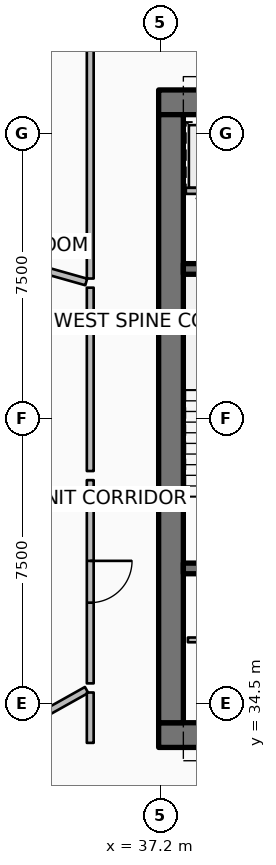
"""IFC4 building model, lengths in metres.
Left out: names, types, materials, properties, quantities, classifications, styles, units other than length and angle.
Written with IfcOpenShell. Run it as: python <this file> out.ifc"""

import sys

from ifc_helpers import new_model, si_unit, direction, frame, frame_2d, origin, place, context, subcontext, project, spatial, rectangle, extrude, element, fill, save


model = new_model("IFC4")
c1 = context("Model", 3, precision=1e-05, world=origin(), true_north=direction((0.0, 1.0)))
c2 = subcontext(c1, "Body", "Model", "MODEL_VIEW")
j1 = project(units=[si_unit("LENGTHUNIT", "METRE"), si_unit("PLANEANGLEUNIT", "RADIAN")], contexts=[c1])
p1 = place(None, origin())
s1 = spatial("IfcSite", under=j1, at=p1, CompositionType="ELEMENT")
p2 = place(p1, origin())
s2 = spatial("IfcBuilding", under=s1, at=p2, CompositionType="ELEMENT")
p3 = place(p2, frame((0.0, 0.0, 202.8)))
s3 = spatial("IfcBuildingStorey", under=s2, at=p3, CompositionType="ELEMENT", Elevation=202.8)
for number, where, z_axis, x_axis in (
    (1, (37.15, 33.675, 0.0), (0.0, 0.0, 1.0), (1.0, 0.0, 0.0)),
    (2, (37.15, 50.325, 0.0), (0.0, 0.0, 1.0), (1.0, 0.0, 0.0)),
):
    element("IfcWall", number, at=place(p3, frame(where, z_axis=z_axis, x_axis=x_axis)), inside=s3, PredefinedType="SHEAR", context=c2, shape_type="SweptSolid", body=[
        extrude(rectangle(XDim=9.75, YDim=0.65, at=frame_2d((4.875, 0.0))), origin(), (0.0, 0.0, 1.0), 3.75),
    ])
p4 = place(p3, frame((37.475, 34.0, 0.0), z_axis=(0.0, 0.0, 1.0), x_axis=(0.0, 1.0, 0.0)))
e3 = element("IfcWall", 3, at=p4, inside=s3, PredefinedType="SHEAR", context=c2, shape_type="SweptSolid", body=[
    extrude(rectangle(XDim=16.0, YDim=0.65, at=frame_2d((8.0, 0.0))), origin(), (0.0, 0.0, 1.0), 3.75),
])
for number, where, z_axis, x_axis in (
    (4, (37.8, 38.06, 0.0), (0.0, 0.0, 1.0), (1.0, 0.0, 0.0)),
    (5, (37.8, 45.94, 0.0), (0.0, 0.0, 1.0), (1.0, 0.0, 0.0)),
):
    element("IfcWall", number, at=place(p3, frame(where, z_axis=z_axis, x_axis=x_axis)), inside=s3, PredefinedType="SHEAR", context=c2, shape_type="SweptSolid", body=[
        extrude(rectangle(XDim=3.5, YDim=0.28, at=frame_2d((1.75, 0.0))), origin(), (0.0, 0.0, 1.0), 3.75),
    ])
p5 = place(p3, frame((39.975, 47.995, 0.0), z_axis=(0.0, 0.0, 1.0), x_axis=(-1.0, 0.0, 0.0)))
e6 = element("IfcWall", 6, at=p5, inside=s3, PredefinedType="PARTITIONING", context=c2, shape_type="SweptSolid", body=[
    extrude(rectangle(XDim=2.11, YDim=0.16, at=frame_2d((1.055, 0.0))), origin(), (0.0, 0.0, 1.0), 3.5),
])
p6 = place(p5, frame((0.505, 0.0, 0.0)))
e7 = element("IfcOpeningElement", 7, at=p6, cuts=e6, PredefinedType="OPENING", context=c2, shape_type="SweptSolid", body=[
    extrude(rectangle(XDim=1.1, YDim=2.1, at=frame_2d((0.55, 1.05))), frame((0.0, 0.09, 0.0), z_axis=(0.0, -1.0, 0.0), x_axis=(1.0, 0.0, 0.0)), (0.0, 0.0, 1.0), 0.18),
])
p7 = place(p3, frame((37.92, 36.18, 0.0), z_axis=(0.0, 0.0, 1.0), x_axis=(1.0, 0.0, 0.0)))
e8 = element("IfcWall", 8, at=p7, inside=s3, PredefinedType="PARTITIONING", context=c2, shape_type="SweptSolid", body=[
    extrude(rectangle(XDim=3.33, YDim=0.125, at=frame_2d((1.665, 0.0))), origin(), (0.0, 0.0, 1.0), 2.94),
])
p8 = place(p7, frame((1.24, 0.0, 0.0)))
e9 = element("IfcOpeningElement", 9, at=p8, cuts=e8, PredefinedType="OPENING", context=c2, shape_type="SweptSolid", body=[
    extrude(rectangle(XDim=0.85, YDim=2.06, at=frame_2d((0.425, 1.03))), frame((0.0, 0.073, 0.0), z_axis=(0.0, -1.0, 0.0), x_axis=(1.0, 0.0, 0.0)), (0.0, 0.0, 1.0), 0.145),
])
p9 = place(p3, frame((35.244, 45.598, 0.0), z_axis=(0.0, 0.0, 1.0), x_axis=(-0.962456561262, 0.271435752405, 0.0)))
e10 = element("IfcWall", 10, at=p9, inside=s3, PredefinedType="PARTITIONING", context=c2, shape_type="SweptSolid", body=[
    extrude(rectangle(XDim=13.777, YDim=0.18, at=frame_2d((6.888, 0.0))), origin(), (0.0, 0.0, 1.0), 2.94),
])
p10 = place(p3, frame((35.254, 34.862, 0.0), z_axis=(0.0, 0.0, 1.0), x_axis=(-0.872489721771, -0.488632464541, 0.0)))
e11 = element("IfcWall", 11, at=p10, inside=s3, PredefinedType="PARTITIONING", context=c2, shape_type="SweptSolid", body=[
    extrude(rectangle(XDim=13.286, YDim=0.18, at=frame_2d((6.643, 0.0))), origin(), (0.0, 0.0, 1.0), 2.94),
])
p11 = place(p3, frame((35.35, 51.853, 0.0), z_axis=(0.0, 0.0, 1.0), x_axis=(0.0, -1.0, 0.0)))
e12 = element("IfcWall", 12, at=p11, inside=s3, PredefinedType="PARTITIONING", context=c2, shape_type="SweptSolid", body=[
    extrude(rectangle(XDim=6.165, YDim=0.18, at=frame_2d((3.083, 0.0))), origin(), (0.0, 0.0, 1.0), 2.94),
])
p12 = place(p3, frame((35.35, 40.383, 0.0), z_axis=(0.0, 0.0, 1.0), x_axis=(0.0, -1.0, 0.0)))
e13 = element("IfcWall", 13, at=p12, inside=s3, PredefinedType="PARTITIONING", context=c2, shape_type="SweptSolid", body=[
    extrude(rectangle(XDim=5.347, YDim=0.18, at=frame_2d((2.674, 0.0))), origin(), (0.0, 0.0, 1.0), 2.94),
])
p13 = place(p12, frame((2.124, 0.0, 0.0)))
e14 = element("IfcOpeningElement", 14, at=p13, cuts=e13, PredefinedType="OPENING", context=c2, shape_type="SweptSolid", body=[
    extrude(rectangle(XDim=1.1, YDim=2.1, at=frame_2d((0.55, 1.05))), frame((0.0, 0.1, 0.0), z_axis=(0.0, -1.0, 0.0), x_axis=(1.0, 0.0, 0.0)), (0.0, 0.0, 1.0), 0.2),
])
p14 = place(p3, frame((35.35, 45.448, 0.0), z_axis=(0.0, 0.0, 1.0), x_axis=(0.0, -1.0, 0.0)))
e15 = element("IfcWall", 15, at=p14, inside=s3, PredefinedType="PARTITIONING", context=c2, shape_type="SweptSolid", body=[
    extrude(rectangle(XDim=4.825, YDim=0.18, at=frame_2d((2.413, 0.0))), origin(), (0.0, 0.0, 1.0), 2.94),
])
p15 = place(p3, frame((35.35, 34.796, 0.0), z_axis=(0.0, 0.0, 1.0), x_axis=(0.0, -1.0, 0.0)))
e16 = element("IfcWall", 16, at=p15, inside=s3, PredefinedType="PARTITIONING", context=c2, shape_type="SweptSolid", body=[
    extrude(rectangle(XDim=1.326, YDim=0.18, at=frame_2d((0.663, 0.0))), origin(), (0.0, 0.0, 1.0), 2.94),
])
p16 = place(p13, origin())
e17 = element("IfcDoor", 17, at=p16, inside=s3, OperationType="SINGLE_SWING_LEFT", PredefinedType="DOOR", context=c2, shape_type="SweptSolid", body=[
    extrude(rectangle(XDim=1.1, YDim=2.1, at=frame_2d((0.55, 1.05))), frame((0.0, 0.025, 0.0), z_axis=(0.0, -1.0, 0.0), x_axis=(1.0, 0.0, 0.0)), (0.0, 0.0, 1.0), 0.05),
])
fill(e14, e17)
save(model, sys.argv[1])
